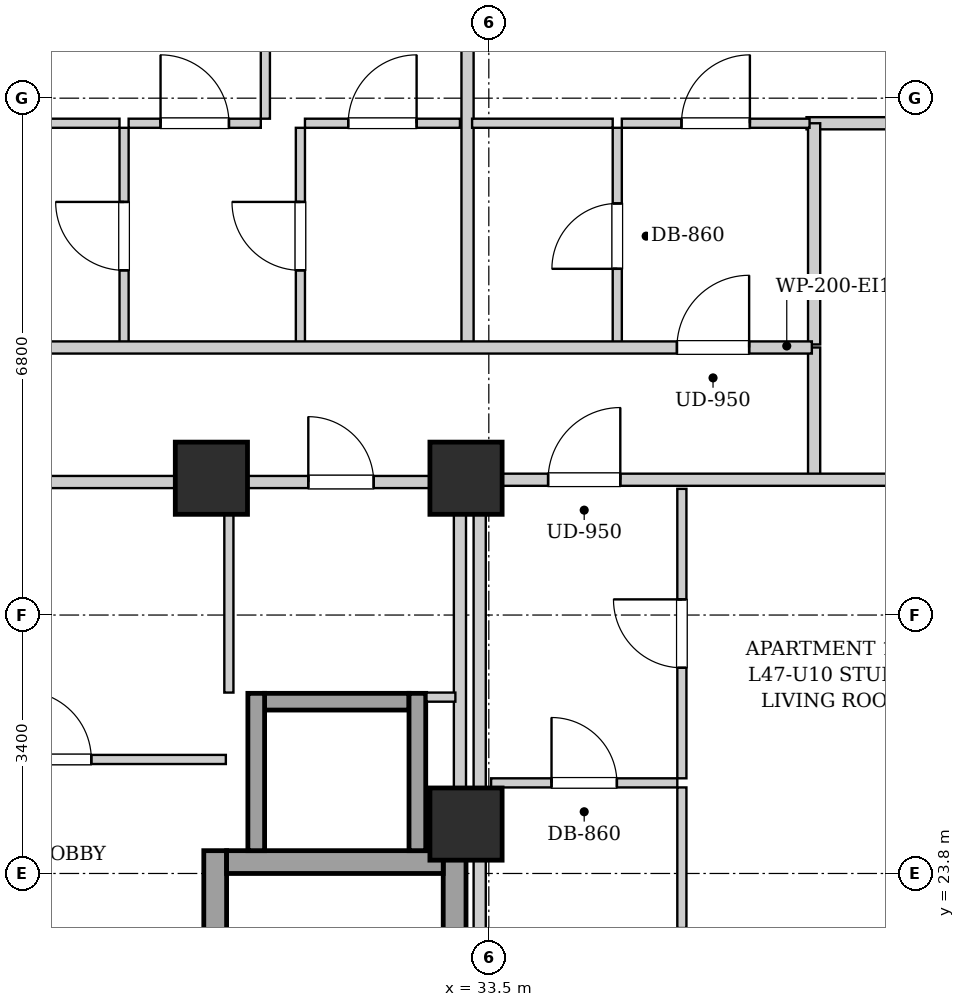
"""IFC4 building model, lengths in metres.
Left out: names, types, materials, properties, quantities, classifications, styles, units other than length and angle.
Written with IfcOpenShell. Run it as: python <this file> out.ifc"""

import sys

from ifc_helpers import new_model, si_unit, direction, frame, frame_2d, origin, origin_2d, place, context, subcontext, project, spatial, rectangle, extrude, element, fill, save


model = new_model("IFC4")
c1 = context("Model", 3, precision=1e-05, world=origin(), true_north=direction((0.0, 1.0)))
c2 = subcontext(c1, "Body", "Model", "MODEL_VIEW")
j1 = project(units=[si_unit("LENGTHUNIT", "METRE"), si_unit("PLANEANGLEUNIT", "RADIAN")], contexts=[c1])
p1 = place(None, origin())
s1 = spatial("IfcSite", under=j1, at=p1, CompositionType="ELEMENT")
p2 = place(p1, origin())
s2 = spatial("IfcBuilding", under=s1, at=p2, CompositionType="ELEMENT")
p3 = place(p2, frame((0.0, 0.0, 163.4)))
s3 = spatial("IfcBuildingStorey", under=s2, at=p3, CompositionType="ELEMENT", Elevation=163.4)
for number, where, z_axis, x_axis in (
    (1, (29.85, 29.0, 0.0), (0.0, 0.0, 1.0), (1.0, 0.0, 0.0)),
    (2, (33.2, 29.0, 0.0), (0.0, 0.0, 1.0), (1.0, 0.0, 0.0)),
    (3, (33.2, 24.45, 0.0), (0.0, 0.0, 1.0), (1.0, 0.0, 0.0)),
):
    element("IfcColumn", number, at=place(p3, frame(where, z_axis=z_axis, x_axis=x_axis)), inside=s3, PredefinedType="COLUMN", context=c2, shape_type="SweptSolid", body=[
        extrude(rectangle(XDim=0.95, YDim=0.95, at=origin_2d()), origin(), (0.0, 0.0, 1.0), 3.25),
    ])
for number, where, z_axis, x_axis in (
    (4, (29.9, 15.1, 0.0), (0.0, 0.0, 1.0), (0.0, 1.0, 0.0)),
    (5, (33.05, 15.1, 0.0), (0.0, 0.0, 1.0), (0.0, 1.0, 0.0)),
):
    element("IfcWall", number, at=place(p3, frame(where, z_axis=z_axis, x_axis=x_axis)), inside=s3, PredefinedType="SHEAR", context=c2, shape_type="SweptSolid", body=[
        extrude(rectangle(XDim=9.0, YDim=0.3, at=frame_2d((4.5, 0.0))), origin(), (0.0, 0.0, 1.0), 2.99),
    ])
p4 = place(p3, frame((30.05, 23.95, 0.0), z_axis=(0.0, 0.0, 1.0), x_axis=(1.0, 0.0, 0.0)))
e6 = element("IfcWall", 6, at=p4, inside=s3, PredefinedType="SHEAR", context=c2, shape_type="SweptSolid", body=[
    extrude(rectangle(XDim=2.85, YDim=0.3, at=frame_2d((1.425, 0.0))), origin(), (0.0, 0.0, 1.0), 2.99),
])
p5 = place(p3, frame((30.55, 26.06, 0.0), z_axis=(0.0, 0.0, 1.0), x_axis=(1.0, 0.0, 0.0)))
e7 = element("IfcWall", 7, at=p5, inside=s3, PredefinedType="SHEAR", context=c2, shape_type="SweptSolid", body=[
    extrude(rectangle(XDim=1.9, YDim=0.22, at=frame_2d((0.95, 0.0))), origin(), (0.0, 0.0, 1.0), 2.99),
])
for number, where, z_axis, x_axis in (
    (8, (30.44, 24.1, 0.0), (0.0, 0.0, 1.0), (0.0, 1.0, 0.0)),
    (9, (32.56, 24.1, 0.0), (0.0, 0.0, 1.0), (0.0, 1.0, 0.0)),
):
    element("IfcWall", number, at=place(p3, frame(where, z_axis=z_axis, x_axis=x_axis)), inside=s3, PredefinedType="SHEAR", context=c2, shape_type="SweptSolid", body=[
        extrude(rectangle(XDim=2.07, YDim=0.22, at=frame_2d((1.035, 0.0))), origin(), (0.0, 0.0, 1.0), 2.99),
    ])
p6 = place(p3, frame((33.12, 24.12, 0.0), z_axis=(0.0, 0.0, 1.0), x_axis=(0.0, 1.0, 0.0)))
e10 = element("IfcWall", 10, at=p6, inside=s3, PredefinedType="PARTITIONING", context=c2, shape_type="SweptSolid", body=[
    extrude(rectangle(XDim=4.76, YDim=0.16, at=frame_2d((2.38, 0.0))), origin(), (0.0, 0.0, 1.0), 2.99),
])
p7 = place(p3, frame((30.08, 26.18, 0.0), z_axis=(0.0, 0.0, 1.0), x_axis=(0.0, 1.0, 0.0)))
e11 = element("IfcWall", 11, at=p7, inside=s3, PredefinedType="PARTITIONING", context=c2, shape_type="SweptSolid", body=[
    extrude(rectangle(XDim=2.68, YDim=0.12, at=frame_2d((1.34, 0.0))), origin(), (0.0, 0.0, 1.0), 2.99),
])
p8 = place(p3, frame((32.68, 26.12, 0.0), z_axis=(0.0, 0.0, 1.0), x_axis=(1.0, 0.0, 0.0)))
e12 = element("IfcWall", 12, at=p8, inside=s3, PredefinedType="PARTITIONING", context=c2, shape_type="SweptSolid", body=[
    extrude(rectangle(XDim=0.38, YDim=0.12, at=frame_2d((0.19, 0.0))), origin(), (0.0, 0.0, 1.0), 2.99),
])
p9 = place(p3, frame((30.08, 28.95, 0.0), z_axis=(0.0, 0.0, 1.0), x_axis=(1.0, 0.0, 0.0)))
e13 = element("IfcWall", 13, at=p9, inside=s3, PredefinedType="PARTITIONING", context=c2, shape_type="SweptSolid", body=[
    extrude(rectangle(XDim=2.96, YDim=0.16, at=frame_2d((1.48, 0.0))), origin(), (0.0, 0.0, 1.0), 2.99),
])
p10 = place(p9, frame((1.045, 0.0, 0.0)))
e14 = element("IfcOpeningElement", 14, at=p10, cuts=e13, PredefinedType="OPENING", context=c2, shape_type="SweptSolid", body=[
    extrude(rectangle(XDim=0.86, YDim=2.05, at=frame_2d((0.43, 1.025))), frame((0.0, 0.09, 0.0), z_axis=(0.0, -1.0, 0.0), x_axis=(1.0, 0.0, 0.0)), (0.0, 0.0, 1.0), 0.18),
])
p11 = place(p3, frame((25.72, 28.95, 0.0), z_axis=(0.0, 0.0, 1.0), x_axis=(1.0, 0.0, 0.0)))
e15 = element("IfcWall", 15, at=p11, inside=s3, PredefinedType="PARTITIONING", context=c2, shape_type="SweptSolid", body=[
    extrude(rectangle(XDim=4.32, YDim=0.16, at=frame_2d((2.16, 0.0))), origin(), (0.0, 0.0, 1.0), 2.442),
])
p12 = place(p3, frame((25.72, 25.3, 0.0), z_axis=(0.0, 0.0, 1.0), x_axis=(1.0, 0.0, 0.0)))
e16 = element("IfcWall", 16, at=p12, inside=s3, PredefinedType="PARTITIONING", context=c2, shape_type="SweptSolid", body=[
    extrude(rectangle(XDim=4.32, YDim=0.12, at=frame_2d((2.16, 0.0))), origin(), (0.0, 0.0, 1.0), 2.99),
])
p13 = place(p12, frame((1.65, 0.0, 0.0)))
e17 = element("IfcOpeningElement", 17, at=p13, cuts=e16, PredefinedType="OPENING", context=c2, shape_type="SweptSolid", body=[
    extrude(rectangle(XDim=0.9, YDim=2.05, at=frame_2d((0.45, 1.025))), frame((0.0, 0.07, 0.0), z_axis=(0.0, -1.0, 0.0), x_axis=(1.0, 0.0, 0.0)), (0.0, 0.0, 1.0), 0.14),
])
p14 = place(p3, frame((37.78, 28.98, 0.0), z_axis=(0.0, 0.0, 1.0), x_axis=(0.0, 1.0, 0.0)))
e18 = element("IfcWall", 18, at=p14, inside=s3, PredefinedType="PARTITIONING", context=c2, shape_type="SweptSolid", body=[
    extrude(rectangle(XDim=1.74, YDim=0.16, at=frame_2d((0.87, 0.0))), origin(), (0.0, 0.0, 1.0), 2.99),
])
p15 = place(p3, frame((28.701, 30.76, 0.0), z_axis=(0.0, 0.0, 1.0), x_axis=(0.0, 1.0, 0.0)))
e19 = element("IfcWall", 19, at=p15, inside=s3, PredefinedType="PARTITIONING", context=c2, shape_type="SweptSolid", body=[
    extrude(rectangle(XDim=2.85, YDim=0.12, at=frame_2d((1.425, 0.0))), origin(), (0.0, 0.0, 1.0), 2.99),
])
p16 = place(p15, frame((0.975, 0.0, 0.0)))
e20 = element("IfcOpeningElement", 20, at=p16, cuts=e19, PredefinedType="OPENING", context=c2, shape_type="SweptSolid", body=[
    extrude(rectangle(XDim=0.9, YDim=2.05, at=frame_2d((0.45, 1.025))), frame((0.0, 0.07, 0.0), z_axis=(0.0, -1.0, 0.0), x_axis=(1.0, 0.0, 0.0)), (0.0, 0.0, 1.0), 0.14),
])
p17 = place(p3, frame((24.901, 33.67, 0.0), z_axis=(0.0, 0.0, 1.0), x_axis=(1.0, 0.0, 0.0)))
e21 = element("IfcWall", 21, at=p17, inside=s3, PredefinedType="PARTITIONING", context=c2, shape_type="SweptSolid", body=[
    extrude(rectangle(XDim=3.74, YDim=0.12, at=frame_2d((1.87, 0.0))), origin(), (0.0, 0.0, 1.0), 2.99),
])
p18 = place(p17, frame((1.42, 0.0, 0.0)))
e22 = element("IfcOpeningElement", 22, at=p18, cuts=e21, PredefinedType="OPENING", context=c2, shape_type="SweptSolid", body=[
    extrude(rectangle(XDim=0.9, YDim=2.05, at=frame_2d((0.45, 1.025))), frame((0.0, 0.07, 0.0), z_axis=(0.0, -1.0, 0.0), x_axis=(1.0, 0.0, 0.0)), (0.0, 0.0, 1.0), 0.14),
])
p19 = place(p3, frame((31.021, 30.76, 0.0), z_axis=(0.0, 0.0, 1.0), x_axis=(0.0, 1.0, 0.0)))
e23 = element("IfcWall", 23, at=p19, inside=s3, PredefinedType="PARTITIONING", context=c2, shape_type="SweptSolid", body=[
    extrude(rectangle(XDim=2.85, YDim=0.12, at=frame_2d((1.425, 0.0))), origin(), (0.0, 0.0, 1.0), 2.99),
])
p20 = place(p19, frame((0.975, 0.0, 0.0)))
e24 = element("IfcOpeningElement", 24, at=p20, cuts=e23, PredefinedType="OPENING", context=c2, shape_type="SweptSolid", body=[
    extrude(rectangle(XDim=0.9, YDim=2.05, at=frame_2d((0.45, 1.025))), frame((0.0, 0.07, 0.0), z_axis=(0.0, -1.0, 0.0), x_axis=(1.0, 0.0, 0.0)), (0.0, 0.0, 1.0), 0.14),
])
p21 = place(p3, frame((28.761, 33.67, 0.0), z_axis=(0.0, 0.0, 1.0), x_axis=(1.0, 0.0, 0.0)))
e25 = element("IfcWall", 25, at=p21, inside=s3, PredefinedType="PARTITIONING", context=c2, shape_type="SweptSolid", body=[
    extrude(rectangle(XDim=1.739, YDim=0.12, at=frame_2d((0.87, 0.0))), origin(), (0.0, 0.0, 1.0), 2.99),
])
p22 = place(p21, frame((0.42, 0.0, 0.0)))
e26 = element("IfcOpeningElement", 26, at=p22, cuts=e25, PredefinedType="OPENING", context=c2, shape_type="SweptSolid", body=[
    extrude(rectangle(XDim=0.9, YDim=2.05, at=frame_2d((0.45, 1.025))), frame((0.0, 0.07, 0.0), z_axis=(0.0, -1.0, 0.0), x_axis=(1.0, 0.0, 0.0)), (0.0, 0.0, 1.0), 0.14),
])
p23 = place(p3, frame((31.081, 33.67, 0.0), z_axis=(0.0, 0.0, 1.0), x_axis=(1.0, 0.0, 0.0)))
e27 = element("IfcWall", 27, at=p23, inside=s3, PredefinedType="PARTITIONING", context=c2, shape_type="SweptSolid", body=[
    extrude(rectangle(XDim=2.039, YDim=0.12, at=frame_2d((1.02, 0.0))), origin(), (0.0, 0.0, 1.0), 2.99),
])
p24 = place(p23, frame((0.569, 0.0, 0.0)))
e28 = element("IfcOpeningElement", 28, at=p24, cuts=e27, PredefinedType="OPENING", context=c2, shape_type="SweptSolid", body=[
    extrude(rectangle(XDim=0.9, YDim=2.05, at=frame_2d((0.45, 1.025))), frame((0.0, 0.07, 0.0), z_axis=(0.0, -1.0, 0.0), x_axis=(1.0, 0.0, 0.0)), (0.0, 0.0, 1.0), 0.14),
])
p25 = place(p3, frame((30.56, 33.73, 0.0), z_axis=(0.0, 0.0, 1.0), x_axis=(0.0, 1.0, 0.0)))
e29 = element("IfcWall", 29, at=p25, inside=s3, PredefinedType="PARTITIONING", context=c2, shape_type="SweptSolid", body=[
    extrude(rectangle(XDim=7.14, YDim=0.12, at=frame_2d((3.57, 0.0))), origin(), (0.0, 0.0, 1.0), 2.99),
])
p26 = place(p25, frame((3.12, 0.0, 0.0)))
e30 = element("IfcOpeningElement", 30, at=p26, cuts=e29, PredefinedType="OPENING", context=c2, shape_type="SweptSolid", body=[
    extrude(rectangle(XDim=0.9, YDim=2.05, at=frame_2d((0.45, 1.025))), frame((0.0, 0.07, 0.0), z_axis=(0.0, -1.0, 0.0), x_axis=(1.0, 0.0, 0.0)), (0.0, 0.0, 1.0), 0.14),
])
p27 = place(p3, frame((37.68, 33.67, 0.0), z_axis=(0.0, 0.0, 1.0), x_axis=(1.0, 0.0, 0.0)))
e31 = element("IfcWall", 31, at=p27, inside=s3, PredefinedType="PARTITIONING", context=c2, shape_type="SweptSolid", body=[
    extrude(rectangle(XDim=2.34, YDim=0.16, at=frame_2d((1.17, 0.0))), origin(), (0.0, 0.0, 1.0), 2.99),
])
p28 = place(p3, frame((37.78, 30.76, 0.0), z_axis=(0.0, 0.0, 1.0), x_axis=(0.0, 1.0, 0.0)))
e32 = element("IfcWall", 32, at=p28, inside=s3, PredefinedType="PARTITIONING", context=c2, shape_type="SweptSolid", body=[
    extrude(rectangle(XDim=2.91, YDim=0.16, at=frame_2d((1.455, 0.0))), origin(), (0.0, 0.0, 1.0), 2.99),
])
p29 = place(p3, frame((33.22, 30.76, 0.0), z_axis=(0.0, 0.0, 1.0), x_axis=(0.0, 1.0, 0.0)))
e33 = element("IfcWall", 33, at=p29, inside=s3, PredefinedType="PARTITIONING", context=c2, shape_type="SweptSolid", body=[
    extrude(rectangle(XDim=10.28, YDim=0.16, at=frame_2d((5.14, 0.0))), origin(), (0.0, 0.0, 1.0), 2.442),
])
p30 = place(p3, frame((35.19, 30.76, 0.0), z_axis=(0.0, 0.0, 1.0), x_axis=(0.0, 1.0, 0.0)))
e34 = element("IfcWall", 34, at=p30, inside=s3, PredefinedType="PARTITIONING", context=c2, shape_type="SweptSolid", body=[
    extrude(rectangle(XDim=2.85, YDim=0.12, at=frame_2d((1.425, 0.0))), origin(), (0.0, 0.0, 1.0), 2.99),
])
p31 = place(p30, frame((0.995, 0.0, 0.0)))
e35 = element("IfcOpeningElement", 35, at=p31, cuts=e34, PredefinedType="OPENING", context=c2, shape_type="SweptSolid", body=[
    extrude(rectangle(XDim=0.86, YDim=2.05, at=frame_2d((0.43, 1.025))), frame((0.0, 0.07, 0.0), z_axis=(0.0, -1.0, 0.0), x_axis=(1.0, 0.0, 0.0)), (0.0, 0.0, 1.0), 0.14),
])
p32 = place(p3, frame((33.28, 33.67, 0.0), z_axis=(0.0, 0.0, 1.0), x_axis=(1.0, 0.0, 0.0)))
e36 = element("IfcWall", 36, at=p32, inside=s3, PredefinedType="PARTITIONING", context=c2, shape_type="SweptSolid", body=[
    extrude(rectangle(XDim=1.85, YDim=0.12, at=frame_2d((0.925, 0.0))), origin(), (0.0, 0.0, 1.0), 2.99),
])
p33 = place(p3, frame((35.25, 33.67, 0.0), z_axis=(0.0, 0.0, 1.0), x_axis=(1.0, 0.0, 0.0)))
e37 = element("IfcWall", 37, at=p33, inside=s3, PredefinedType="PARTITIONING", context=c2, shape_type="SweptSolid", body=[
    extrude(rectangle(XDim=2.47, YDim=0.12, at=frame_2d((1.235, 0.0))), origin(), (0.0, 0.0, 1.0), 2.99),
])
p34 = place(p33, frame((0.785, 0.0, 0.0)))
e38 = element("IfcOpeningElement", 38, at=p34, cuts=e37, PredefinedType="OPENING", context=c2, shape_type="SweptSolid", body=[
    extrude(rectangle(XDim=0.9, YDim=2.05, at=frame_2d((0.45, 1.025))), frame((0.0, 0.07, 0.0), z_axis=(0.0, -1.0, 0.0), x_axis=(1.0, 0.0, 0.0)), (0.0, 0.0, 1.0), 0.14),
])
p35 = place(p3, frame((33.38, 28.98, 0.0), z_axis=(0.0, 0.0, 1.0), x_axis=(1.0, 0.0, 0.0)))
e39 = element("IfcWall", 39, at=p35, inside=s3, PredefinedType="PARTITIONING", context=c2, shape_type="SweptSolid", body=[
    extrude(rectangle(XDim=6.64, YDim=0.16, at=frame_2d((3.32, 0.0))), origin(), (0.0, 0.0, 1.0), 2.442),
])
p36 = place(p35, frame((0.9, 0.0, 0.0)))
e40 = element("IfcOpeningElement", 40, at=p36, cuts=e39, PredefinedType="OPENING", context=c2, shape_type="SweptSolid", body=[
    extrude(rectangle(XDim=0.95, YDim=2.1, at=frame_2d((0.475, 1.05))), frame((0.0, 0.09, 0.0), z_axis=(0.0, -1.0, 0.0), x_axis=(1.0, 0.0, 0.0)), (0.0, 0.0, 1.0), 0.18),
])
p37 = place(p3, frame((33.53, 24.992, 0.0), z_axis=(0.0, 0.0, 1.0), x_axis=(1.0, 0.0, 0.0)))
e41 = element("IfcWall", 41, at=p37, inside=s3, PredefinedType="PARTITIONING", context=c2, shape_type="SweptSolid", body=[
    extrude(rectangle(XDim=2.45, YDim=0.12, at=frame_2d((1.225, 0.0))), origin(), (0.0, 0.0, 1.0), 2.99),
])
p38 = place(p37, frame((0.795, 0.0, 0.0)))
e42 = element("IfcOpeningElement", 42, at=p38, cuts=e41, PredefinedType="OPENING", context=c2, shape_type="SweptSolid", body=[
    extrude(rectangle(XDim=0.86, YDim=2.05, at=frame_2d((0.43, 1.025))), frame((0.0, 0.07, 0.0), z_axis=(0.0, -1.0, 0.0), x_axis=(1.0, 0.0, 0.0)), (0.0, 0.0, 1.0), 0.14),
])
p39 = place(p3, frame((36.04, 23.082, 0.0), z_axis=(0.0, 0.0, 1.0), x_axis=(0.0, 1.0, 0.0)))
e43 = element("IfcWall", 43, at=p39, inside=s3, PredefinedType="PARTITIONING", context=c2, shape_type="SweptSolid", body=[
    extrude(rectangle(XDim=1.85, YDim=0.12, at=frame_2d((0.925, 0.0))), origin(), (0.0, 0.0, 1.0), 2.99),
])
p40 = place(p3, frame((36.04, 25.052, 0.0), z_axis=(0.0, 0.0, 1.0), x_axis=(0.0, 1.0, 0.0)))
e44 = element("IfcWall", 44, at=p40, inside=s3, PredefinedType="PARTITIONING", context=c2, shape_type="SweptSolid", body=[
    extrude(rectangle(XDim=3.808, YDim=0.12, at=frame_2d((1.904, 0.0))), origin(), (0.0, 0.0, 1.0), 2.99),
])
p41 = place(p40, frame((1.454, 0.0, 0.0)))
e45 = element("IfcOpeningElement", 45, at=p41, cuts=e44, PredefinedType="OPENING", context=c2, shape_type="SweptSolid", body=[
    extrude(rectangle(XDim=0.9, YDim=2.05, at=frame_2d((0.45, 1.025))), frame((0.0, 0.07, 0.0), z_axis=(0.0, -1.0, 0.0), x_axis=(1.0, 0.0, 0.0)), (0.0, 0.0, 1.0), 0.14),
])
p42 = place(p3, frame((10.05, 30.72, 0.0), z_axis=(0.0, 0.0, 1.0), x_axis=(1.0, 0.0, 0.0)))
e46 = element("IfcWall", 46, at=p42, inside=s3, PredefinedType="PARTITIONING", context=c2, shape_type="SweptSolid", body=[
    extrude(rectangle(XDim=27.7, YDim=0.16, at=frame_2d((13.85, 0.0))), origin(), (0.0, 0.0, 1.0), 2.99),
])
p43 = place(p42, frame((4.288, 0.0, 0.0)))
e47 = element("IfcOpeningElement", 47, at=p43, cuts=e46, PredefinedType="OPENING", context=c2, shape_type="SweptSolid", body=[
    extrude(rectangle(XDim=0.95, YDim=2.1, at=frame_2d((0.475, 1.05))), frame((0.0, 0.09, 0.0), z_axis=(0.0, -1.0, 0.0), x_axis=(1.0, 0.0, 0.0)), (0.0, 0.0, 1.0), 0.18),
])
p44 = place(p42, frame((9.515, 0.0, 0.0)))
e48 = element("IfcOpeningElement", 48, at=p44, cuts=e46, PredefinedType="OPENING", context=c2, shape_type="SweptSolid", body=[
    extrude(rectangle(XDim=0.95, YDim=2.1, at=frame_2d((0.475, 1.05))), frame((0.0, 0.09, 0.0), z_axis=(0.0, -1.0, 0.0), x_axis=(1.0, 0.0, 0.0)), (0.0, 0.0, 1.0), 0.18),
])
p45 = place(p42, frame((15.896, 0.0, 0.0)))
e49 = element("IfcOpeningElement", 49, at=p45, cuts=e46, PredefinedType="OPENING", context=c2, shape_type="SweptSolid", body=[
    extrude(rectangle(XDim=0.95, YDim=2.1, at=frame_2d((0.475, 1.05))), frame((0.0, 0.09, 0.0), z_axis=(0.0, -1.0, 0.0), x_axis=(1.0, 0.0, 0.0)), (0.0, 0.0, 1.0), 0.18),
])
p46 = place(p42, frame((25.925, 0.0, 0.0)))
e50 = element("IfcOpeningElement", 50, at=p46, cuts=e46, PredefinedType="OPENING", context=c2, shape_type="SweptSolid", body=[
    extrude(rectangle(XDim=0.95, YDim=2.1, at=frame_2d((0.475, 1.05))), frame((0.0, 0.09, 0.0), z_axis=(0.0, -1.0, 0.0), x_axis=(1.0, 0.0, 0.0)), (0.0, 0.0, 1.0), 0.18),
])
p47 = place(p3, frame((33.38, 15.02, 0.0), z_axis=(0.0, 0.0, 1.0), x_axis=(0.0, 1.0, 0.0)))
e51 = element("IfcWall", 51, at=p47, inside=s3, PredefinedType="PARTITIONING", context=c2, shape_type="SweptSolid", body=[
    extrude(rectangle(XDim=13.98, YDim=0.16, at=frame_2d((6.99, 0.0))), origin(), (0.0, 0.0, 1.0), 2.99),
])
p48 = place(p10, origin())
e52 = element("IfcDoor", 52, at=p48, inside=s3, OperationType="SINGLE_SWING_LEFT", PredefinedType="DOOR", context=c2, shape_type="SweptSolid", body=[
    extrude(rectangle(XDim=0.86, YDim=2.05, at=frame_2d((0.43, 1.025))), frame((0.0, 0.025, 0.0), z_axis=(0.0, -1.0, 0.0), x_axis=(1.0, 0.0, 0.0)), (0.0, 0.0, 1.0), 0.05),
])
fill(e14, e52)
p49 = place(p13, origin())
e53 = element("IfcDoor", 53, at=p49, inside=s3, OperationType="SINGLE_SWING_LEFT", PredefinedType="DOOR", context=c2, shape_type="SweptSolid", body=[
    extrude(rectangle(XDim=0.9, YDim=2.05, at=frame_2d((0.45, 1.025))), frame((0.0, 0.025, 0.0), z_axis=(0.0, -1.0, 0.0), x_axis=(1.0, 0.0, 0.0)), (0.0, 0.0, 1.0), 0.05),
])
fill(e17, e53)
p50 = place(p16, origin())
e54 = element("IfcDoor", 54, at=p50, inside=s3, OperationType="SINGLE_SWING_RIGHT", PredefinedType="DOOR", context=c2, shape_type="SweptSolid", body=[
    extrude(rectangle(XDim=0.9, YDim=2.05, at=frame_2d((0.45, 1.025))), frame((0.0, 0.025, 0.0), z_axis=(0.0, -1.0, 0.0), x_axis=(1.0, 0.0, 0.0)), (0.0, 0.0, 1.0), 0.05),
])
fill(e20, e54)
p51 = place(p20, origin())
e55 = element("IfcDoor", 55, at=p51, inside=s3, OperationType="SINGLE_SWING_RIGHT", PredefinedType="DOOR", context=c2, shape_type="SweptSolid", body=[
    extrude(rectangle(XDim=0.9, YDim=2.05, at=frame_2d((0.45, 1.025))), frame((0.0, 0.025, 0.0), z_axis=(0.0, -1.0, 0.0), x_axis=(1.0, 0.0, 0.0)), (0.0, 0.0, 1.0), 0.05),
])
fill(e24, e55)
p52 = place(p22, origin())
e56 = element("IfcDoor", 56, at=p52, inside=s3, OperationType="SINGLE_SWING_LEFT", PredefinedType="DOOR", context=c2, shape_type="SweptSolid", body=[
    extrude(rectangle(XDim=0.9, YDim=2.05, at=frame_2d((0.45, 1.025))), frame((0.0, 0.025, 0.0), z_axis=(0.0, -1.0, 0.0), x_axis=(1.0, 0.0, 0.0)), (0.0, 0.0, 1.0), 0.05),
])
fill(e26, e56)
p53 = place(p24, origin())
e57 = element("IfcDoor", 57, at=p53, inside=s3, OperationType="SINGLE_SWING_RIGHT", PredefinedType="DOOR", context=c2, shape_type="SweptSolid", body=[
    extrude(rectangle(XDim=0.9, YDim=2.05, at=frame_2d((0.45, 1.025))), frame((0.0, 0.025, 0.0), z_axis=(0.0, -1.0, 0.0), x_axis=(1.0, 0.0, 0.0)), (0.0, 0.0, 1.0), 0.05),
])
fill(e28, e57)
p54 = place(p31, origin())
e58 = element("IfcDoor", 58, at=p54, inside=s3, OperationType="SINGLE_SWING_LEFT", PredefinedType="DOOR", context=c2, shape_type="SweptSolid", body=[
    extrude(rectangle(XDim=0.86, YDim=2.05, at=frame_2d((0.43, 1.025))), frame((0.0, 0.025, 0.0), z_axis=(0.0, -1.0, 0.0), x_axis=(1.0, 0.0, 0.0)), (0.0, 0.0, 1.0), 0.05),
])
fill(e35, e58)
p55 = place(p34, origin())
e59 = element("IfcDoor", 59, at=p55, inside=s3, OperationType="SINGLE_SWING_RIGHT", PredefinedType="DOOR", context=c2, shape_type="SweptSolid", body=[
    extrude(rectangle(XDim=0.9, YDim=2.05, at=frame_2d((0.45, 1.025))), frame((0.0, 0.025, 0.0), z_axis=(0.0, -1.0, 0.0), x_axis=(1.0, 0.0, 0.0)), (0.0, 0.0, 1.0), 0.05),
])
fill(e38, e59)
p56 = place(p36, origin())
e60 = element("IfcDoor", 60, at=p56, inside=s3, OperationType="SINGLE_SWING_RIGHT", PredefinedType="DOOR", context=c2, shape_type="SweptSolid", body=[
    extrude(rectangle(XDim=0.95, YDim=2.1, at=frame_2d((0.475, 1.05))), frame((0.0, 0.025, 0.0), z_axis=(0.0, -1.0, 0.0), x_axis=(1.0, 0.0, 0.0)), (0.0, 0.0, 1.0), 0.05),
])
fill(e40, e60)
p57 = place(p38, origin())
e61 = element("IfcDoor", 61, at=p57, inside=s3, OperationType="SINGLE_SWING_LEFT", PredefinedType="DOOR", context=c2, shape_type="SweptSolid", body=[
    extrude(rectangle(XDim=0.86, YDim=2.05, at=frame_2d((0.43, 1.025))), frame((0.0, 0.025, 0.0), z_axis=(0.0, -1.0, 0.0), x_axis=(1.0, 0.0, 0.0)), (0.0, 0.0, 1.0), 0.05),
])
fill(e42, e61)
p58 = place(p41, origin())
e62 = element("IfcDoor", 62, at=p58, inside=s3, OperationType="SINGLE_SWING_RIGHT", PredefinedType="DOOR", context=c2, shape_type="SweptSolid", body=[
    extrude(rectangle(XDim=0.9, YDim=2.05, at=frame_2d((0.45, 1.025))), frame((0.0, 0.025, 0.0), z_axis=(0.0, -1.0, 0.0), x_axis=(1.0, 0.0, 0.0)), (0.0, 0.0, 1.0), 0.05),
])
fill(e45, e62)
p59 = place(p46, origin())
e63 = element("IfcDoor", 63, at=p59, inside=s3, OperationType="SINGLE_SWING_RIGHT", PredefinedType="DOOR", context=c2, shape_type="SweptSolid", body=[
    extrude(rectangle(XDim=0.95, YDim=2.1, at=frame_2d((0.475, 1.05))), frame((0.0, 0.025, 0.0), z_axis=(0.0, -1.0, 0.0), x_axis=(1.0, 0.0, 0.0)), (0.0, 0.0, 1.0), 0.05),
])
fill(e50, e63)
save(model, sys.argv[1])
